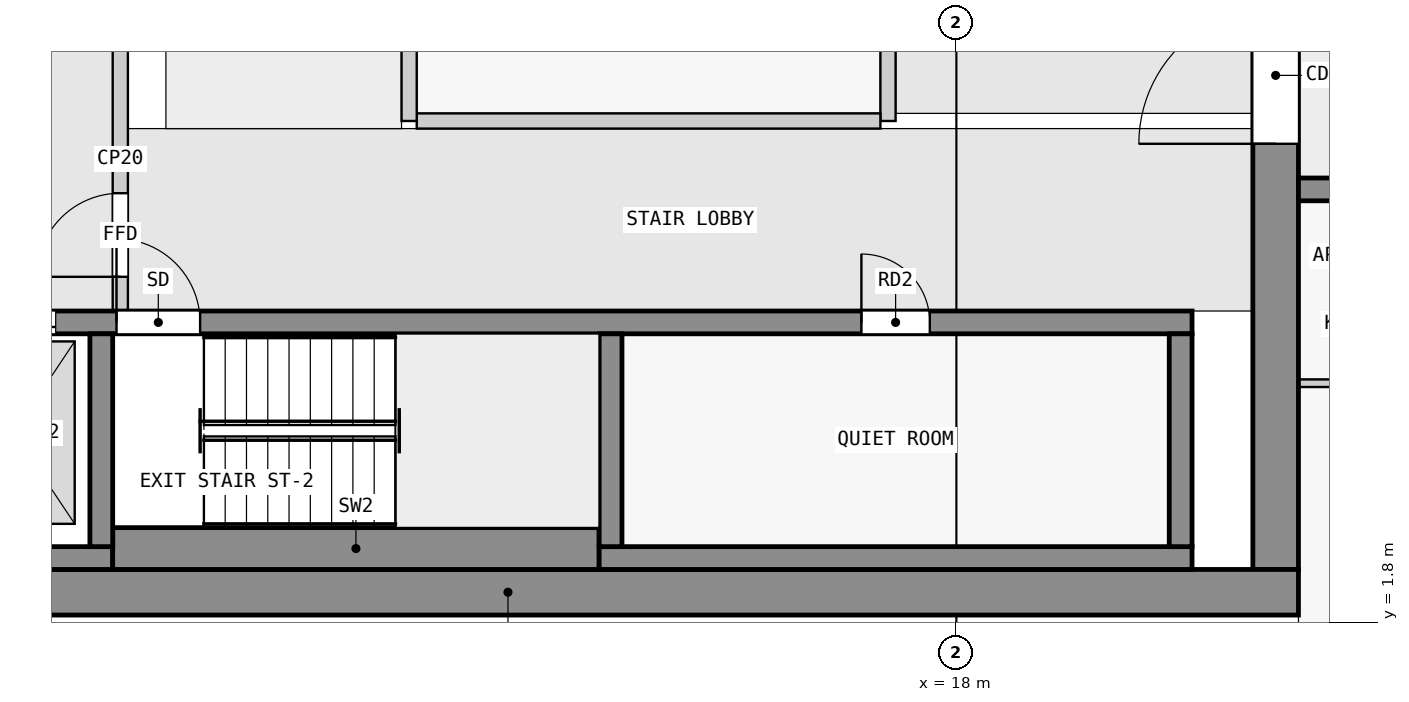
"""IFC4 building model, lengths in metres.
Left out: names, types, materials, properties, quantities, classifications, styles, units other than length and angle.
Written with IfcOpenShell. Run it as: python <this file> out.ifc"""

import sys

from ifc_helpers import new_model, si_unit, direction, frame, frame_2d, origin, place, context, subcontext, project, spatial, rectangle, extrude, element, fill, save


model = new_model("IFC4")
c1 = context("Model", 3, precision=1e-05, world=origin(), true_north=direction((0.0, 1.0)))
c2 = subcontext(c1, "Body", "Model", "MODEL_VIEW")
j1 = project(units=[si_unit("LENGTHUNIT", "METRE"), si_unit("PLANEANGLEUNIT", "RADIAN")], contexts=[c1])
p1 = place(None, origin())
s1 = spatial("IfcSite", under=j1, at=p1, CompositionType="ELEMENT")
p2 = place(p1, origin())
s2 = spatial("IfcBuilding", under=s1, at=p2, CompositionType="ELEMENT")
p3 = place(p2, frame((0.0, 0.0, 149.9)))
s3 = spatial("IfcBuildingStorey", under=s2, at=p3, CompositionType="ELEMENT", Elevation=149.9)
p4 = place(p3, frame((1.7, 2.2, 0.0), z_axis=(0.0, 0.0, 1.0), x_axis=(1.0, 0.0, 0.0)))
e1 = element("IfcWall", 1, at=p4, inside=s3, PredefinedType="SHEAR", context=c2, shape_type="SweptSolid", body=[
    extrude(rectangle(XDim=20.8, YDim=0.6, at=frame_2d((10.4, 0.0))), origin(), (0.0, 0.0, 1.0), 3.25),
])
p5 = place(p3, frame((22.2, 2.5, 0.0), z_axis=(0.0, 0.0, 1.0), x_axis=(0.0, 1.0, 0.0)))
e2 = element("IfcWall", 2, at=p5, inside=s3, PredefinedType="SHEAR", context=c2, shape_type="SweptSolid", body=[
    extrude(rectangle(XDim=14.9, YDim=0.6, at=frame_2d((7.45, 0.0))), origin(), (0.0, 0.0, 1.0), 3.25),
])
p6 = place(p5, frame((5.6, 0.0, 0.0)))
e3 = element("IfcOpeningElement", 3, at=p6, cuts=e2, PredefinedType="OPENING", context=c2, shape_type="SweptSolid", body=[
    extrude(rectangle(XDim=1.8, YDim=2.1, at=frame_2d((0.9, 1.05))), frame((0.0, 0.31, 0.0), z_axis=(0.0, -1.0, 0.0), x_axis=(1.0, 0.0, 0.0)), (0.0, 0.0, 1.0), 0.62),
])
p7 = place(p3, frame((2.3, 2.65, 0.0), z_axis=(0.0, 0.0, 1.0), x_axis=(1.0, 0.0, 0.0)))
e4 = element("IfcWall", 4, at=p7, inside=s3, PredefinedType="SHEAR", context=c2, shape_type="SweptSolid", body=[
    extrude(rectangle(XDim=4.6, YDim=0.3, at=frame_2d((2.3, 0.0))), origin(), (0.0, 0.0, 1.0), 3.25),
])
p8 = place(p3, frame((6.9, 2.775, 0.0), z_axis=(0.0, 0.0, 1.0), x_axis=(1.0, 0.0, 0.0)))
e5 = element("IfcWall", 5, at=p8, inside=s3, PredefinedType="SHEAR", context=c2, shape_type="SweptSolid", body=[
    extrude(rectangle(XDim=6.4, YDim=0.55, at=frame_2d((3.2, 0.0))), origin(), (0.0, 0.0, 1.0), 3.25),
])
p9 = place(p3, frame((13.3, 2.65, 0.0), z_axis=(0.0, 0.0, 1.0), x_axis=(1.0, 0.0, 0.0)))
e6 = element("IfcWall", 6, at=p9, inside=s3, PredefinedType="SHEAR", context=c2, shape_type="SweptSolid", body=[
    extrude(rectangle(XDim=7.8, YDim=0.3, at=frame_2d((3.9, 0.0))), origin(), (0.0, 0.0, 1.0), 3.25),
])
for number, where, z_axis, x_axis in (
    (7, (6.75, 2.8, 0.0), (0.0, 0.0, 1.0), (0.0, 1.0, 0.0)),
    (8, (13.45, 2.8, 0.0), (0.0, 0.0, 1.0), (0.0, 1.0, 0.0)),
    (9, (20.95, 2.8, 0.0), (0.0, 0.0, 1.0), (0.0, 1.0, 0.0)),
):
    element("IfcWall", number, at=place(p3, frame(where, z_axis=z_axis, x_axis=x_axis)), inside=s3, PredefinedType="SHEAR", context=c2, shape_type="SweptSolid", body=[
        extrude(rectangle(XDim=2.8, YDim=0.3, at=frame_2d((1.4, 0.0))), origin(), (0.0, 0.0, 1.0), 3.25),
    ])
p10 = place(p3, frame((2.3, 5.75, 0.0), z_axis=(0.0, 0.0, 1.0), x_axis=(1.0, 0.0, 0.0)))
e10 = element("IfcWall", 10, at=p10, inside=s3, PredefinedType="SHEAR", context=c2, shape_type="SweptSolid", body=[
    extrude(rectangle(XDim=18.8, YDim=0.3, at=frame_2d((9.4, 0.0))), origin(), (0.0, 0.0, 1.0), 3.25),
])
p11 = place(p10, frame((4.65, 0.0, 0.0)))
e11 = element("IfcOpeningElement", 11, at=p11, cuts=e10, PredefinedType="OPENING", context=c2, shape_type="SweptSolid", body=[
    extrude(rectangle(XDim=1.1, YDim=2.1, at=frame_2d((0.55, 1.05))), frame((0.0, 0.16, 0.0), z_axis=(0.0, -1.0, 0.0), x_axis=(1.0, 0.0, 0.0)), (0.0, 0.0, 1.0), 0.32),
])
p12 = place(p10, frame((0.45, 0.0, 0.0)))
e12 = element("IfcOpeningElement", 12, at=p12, cuts=e10, PredefinedType="OPENING", context=c2, shape_type="SweptSolid", body=[
    extrude(rectangle(XDim=1.1, YDim=2.1, at=frame_2d((0.55, 1.05))), frame((0.0, 0.16, 0.0), z_axis=(0.0, -1.0, 0.0), x_axis=(1.0, 0.0, 0.0)), (0.0, 0.0, 1.0), 0.32),
])
p13 = place(p10, frame((2.75, 0.0, 0.0)))
e13 = element("IfcOpeningElement", 13, at=p13, cuts=e10, PredefinedType="OPENING", context=c2, shape_type="SweptSolid", body=[
    extrude(rectangle(XDim=1.1, YDim=2.1, at=frame_2d((0.55, 1.05))), frame((0.0, 0.16, 0.0), z_axis=(0.0, -1.0, 0.0), x_axis=(1.0, 0.0, 0.0)), (0.0, 0.0, 1.0), 0.32),
])
p14 = place(p10, frame((14.45, 0.0, 0.0)))
e14 = element("IfcOpeningElement", 14, at=p14, cuts=e10, PredefinedType="OPENING", context=c2, shape_type="SweptSolid", body=[
    extrude(rectangle(XDim=0.9, YDim=2.1, at=frame_2d((0.45, 1.05))), frame((0.0, 0.16, 0.0), z_axis=(0.0, -1.0, 0.0), x_axis=(1.0, 0.0, 0.0)), (0.0, 0.0, 1.0), 0.32),
])
p15 = place(p3, frame((22.5, 7.5, 0.0), z_axis=(0.0, 0.0, 1.0), x_axis=(1.0, 0.0, 0.0)))
e15 = element("IfcWall", 15, at=p15, inside=s3, PredefinedType="SHEAR", context=c2, shape_type="SweptSolid", body=[
    extrude(rectangle(XDim=22.5, YDim=0.3, at=frame_2d((11.25, 0.0))), origin(), (0.0, 0.0, 1.0), 3.25),
])
p16 = place(p15, frame((4.05, 0.0, 0.0)))
e16 = element("IfcOpeningElement", 16, at=p16, cuts=e15, PredefinedType="OPENING", context=c2, shape_type="SweptSolid", body=[
    extrude(rectangle(XDim=1.0, YDim=2.1, at=frame_2d((0.5, 1.05))), frame((0.0, 0.16, 0.0), z_axis=(0.0, -1.0, 0.0), x_axis=(1.0, 0.0, 0.0)), (0.0, 0.0, 1.0), 0.32),
])
p17 = place(p15, frame((10.35, 0.0, 0.0)))
e17 = element("IfcOpeningElement", 17, at=p17, cuts=e15, PredefinedType="OPENING", context=c2, shape_type="SweptSolid", body=[
    extrude(rectangle(XDim=1.8, YDim=2.1, at=frame_2d((0.9, 1.05))), frame((0.0, 0.16, 0.0), z_axis=(0.0, -1.0, 0.0), x_axis=(1.0, 0.0, 0.0)), (0.0, 0.0, 1.0), 0.32),
])
p18 = place(p15, frame((16.85, 0.0, 0.0)))
e18 = element("IfcOpeningElement", 18, at=p18, cuts=e15, PredefinedType="OPENING", context=c2, shape_type="SweptSolid", body=[
    extrude(rectangle(XDim=1.0, YDim=2.1, at=frame_2d((0.5, 1.05))), frame((0.0, 0.16, 0.0), z_axis=(0.0, -1.0, 0.0), x_axis=(1.0, 0.0, 0.0)), (0.0, 0.0, 1.0), 0.32),
])
p19 = place(p3, frame((7.0, 5.9, 0.0), z_axis=(0.0, 0.0, 1.0), x_axis=(0.0, 1.0, 0.0)))
e19 = element("IfcWall", 19, at=p19, inside=s3, PredefinedType="PARTITIONING", context=c2, shape_type="SweptSolid", body=[
    extrude(rectangle(XDim=4.0, YDim=0.2, at=frame_2d((2.0, 0.0))), origin(), (0.0, 0.0, 1.0), 3.25),
])
p20 = place(p19, frame((0.45, 0.0, 0.0)))
e20 = element("IfcOpeningElement", 20, at=p20, cuts=e19, PredefinedType="OPENING", context=c2, shape_type="SweptSolid", body=[
    extrude(rectangle(XDim=1.1, YDim=2.1, at=frame_2d((0.55, 1.05))), frame((0.0, 0.11, 0.0), z_axis=(0.0, -1.0, 0.0), x_axis=(1.0, 0.0, 0.0)), (0.0, 0.0, 1.0), 0.22),
])
p21 = place(p3, frame((10.8, 8.4, 0.0), z_axis=(0.0, 0.0, 1.0), x_axis=(0.0, 1.0, 0.0)))
e21 = element("IfcWall", 21, at=p21, inside=s3, PredefinedType="PARTITIONING", context=c2, shape_type="SweptSolid", body=[
    extrude(rectangle(XDim=3.8, YDim=0.2, at=frame_2d((1.9, 0.0))), origin(), (0.0, 0.0, 1.0), 3.25),
])
p22 = place(p3, frame((10.9, 8.4, 0.0), z_axis=(0.0, 0.0, 1.0), x_axis=(1.0, 0.0, 0.0)))
e22 = element("IfcWall", 22, at=p22, inside=s3, PredefinedType="PARTITIONING", context=c2, shape_type="SweptSolid", body=[
    extrude(rectangle(XDim=6.1, YDim=0.2, at=frame_2d((3.05, 0.0))), origin(), (0.0, 0.0, 1.0), 3.25),
])
p23 = place(p3, frame((17.1, 8.4, 0.0), z_axis=(0.0, 0.0, 1.0), x_axis=(0.0, 1.0, 0.0)))
e23 = element("IfcWall", 23, at=p23, inside=s3, PredefinedType="PARTITIONING", context=c2, shape_type="SweptSolid", body=[
    extrude(rectangle(XDim=3.8, YDim=0.2, at=frame_2d((1.9, 0.0))), origin(), (0.0, 0.0, 1.0), 3.25),
])
p24 = place(p3, frame((22.5, 4.95, 0.0), z_axis=(0.0, 0.0, 1.0), x_axis=(1.0, 0.0, 0.0)))
e24 = element("IfcWall", 24, at=p24, inside=s3, PredefinedType="PARTITIONING", context=c2, shape_type="SweptSolid", body=[
    extrude(rectangle(XDim=1.75, YDim=0.1, at=frame_2d((0.875, 0.0))), origin(), (0.0, 0.0, 1.0), 3.25),
])
p25 = place(p20, origin())
e25 = element("IfcDoor", 25, at=p25, inside=s3, OperationType="SINGLE_SWING_LEFT", PredefinedType="DOOR", context=c2, shape_type="SweptSolid", body=[
    extrude(rectangle(XDim=1.1, YDim=2.1, at=frame_2d((0.55, 1.05))), frame((0.0, 0.025, 0.0), z_axis=(0.0, -1.0, 0.0), x_axis=(1.0, 0.0, 0.0)), (0.0, 0.0, 1.0), 0.05),
])
fill(e20, e25)
p26 = place(p11, origin())
e26 = element("IfcDoor", 26, at=p26, inside=s3, OperationType="SINGLE_SWING_LEFT", PredefinedType="DOOR", context=c2, shape_type="SweptSolid", body=[
    extrude(rectangle(XDim=1.1, YDim=2.1, at=frame_2d((0.55, 1.05))), frame((0.0, 0.025, 0.0), z_axis=(0.0, -1.0, 0.0), x_axis=(1.0, 0.0, 0.0)), (0.0, 0.0, 1.0), 0.05),
])
fill(e11, e26)
p27 = place(p13, origin())
e27 = element("IfcDoor", 27, at=p27, inside=s3, OperationType="DOUBLE_DOOR_SLIDING", PredefinedType="DOOR", context=c2, shape_type="SweptSolid", body=[
    extrude(rectangle(XDim=1.1, YDim=2.1, at=frame_2d((0.55, 1.05))), frame((0.0, 0.025, 0.0), z_axis=(0.0, -1.0, 0.0), x_axis=(1.0, 0.0, 0.0)), (0.0, 0.0, 1.0), 0.05),
])
fill(e13, e27)
p28 = place(p6, origin())
e28 = element("IfcDoor", 28, at=p28, inside=s3, OperationType="DOUBLE_DOOR_SINGLE_SWING", PredefinedType="DOOR", context=c2, shape_type="SweptSolid", body=[
    extrude(rectangle(XDim=1.8, YDim=2.1, at=frame_2d((0.9, 1.05))), frame((0.0, 0.025, 0.0), z_axis=(0.0, -1.0, 0.0), x_axis=(1.0, 0.0, 0.0)), (0.0, 0.0, 1.0), 0.05),
])
fill(e3, e28)
p29 = place(p14, origin())
e29 = element("IfcDoor", 29, at=p29, inside=s3, OperationType="SINGLE_SWING_LEFT", PredefinedType="DOOR", context=c2, shape_type="SweptSolid", body=[
    extrude(rectangle(XDim=0.9, YDim=2.1, at=frame_2d((0.45, 1.05))), frame((0.0, 0.025, 0.0), z_axis=(0.0, -1.0, 0.0), x_axis=(1.0, 0.0, 0.0)), (0.0, 0.0, 1.0), 0.05),
])
fill(e14, e29)
save(model, sys.argv[1])
